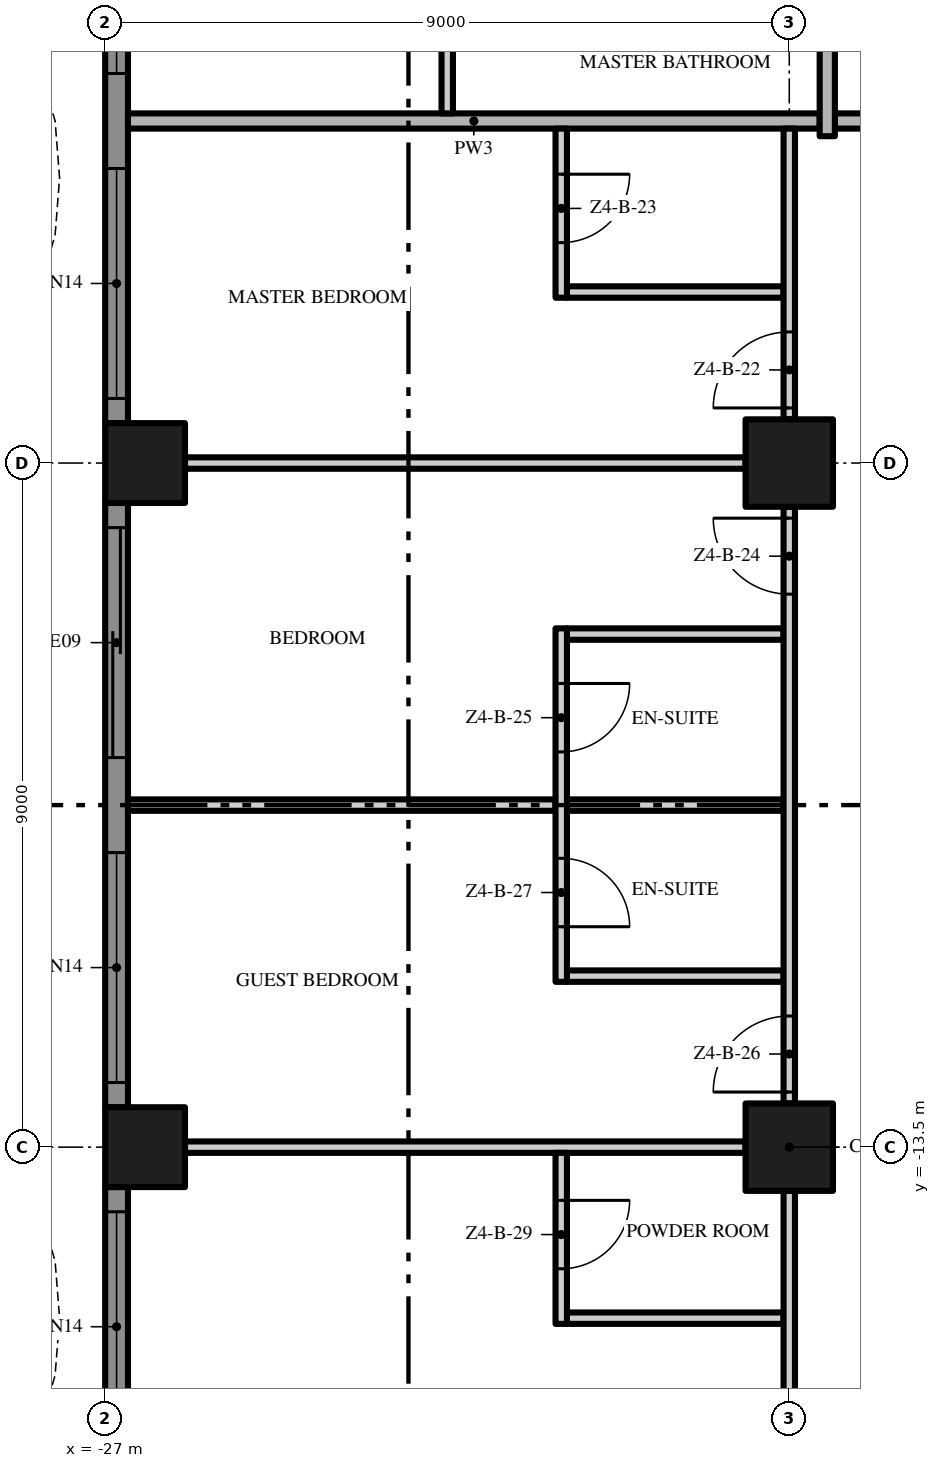
"""IFC4 building model, lengths in metres.
Left out: names, types, materials, properties, quantities, classifications, styles, units other than length and angle.
Written with IfcOpenShell. Run it as: python <this file> out.ifc"""

import sys

from ifc_helpers import new_model, si_unit, direction, frame, frame_2d, origin, origin_2d, place, context, subcontext, project, spatial, polyline, rectangle, outline, extrude, element, fill, save


model = new_model("IFC4")
c1 = context("Model", 3, precision=1e-05, world=origin(), true_north=direction((0.0, 1.0)))
c2 = subcontext(c1, "Body", "Model", "MODEL_VIEW")
j1 = project(units=[si_unit("LENGTHUNIT", "METRE"), si_unit("PLANEANGLEUNIT", "RADIAN")], contexts=[c1])
p1 = place(None, origin())
s1 = spatial("IfcSite", under=j1, at=p1, CompositionType="ELEMENT")
p2 = place(p1, origin())
s2 = spatial("IfcBuilding", under=s1, at=p2, CompositionType="ELEMENT")
p3 = place(p2, frame((0.0, 0.0, 195.8)))
s3 = spatial("IfcBuildingStorey", under=s2, at=p3, CompositionType="ELEMENT", Elevation=195.8)
for number, where, z_axis, x_axis in (
    (1, (-18.0, -13.5, 0.0), (0.0, 0.0, 1.0), (1.0, 0.0, 0.0)),
    (2, (-18.0, -4.5, 0.0), (0.0, 0.0, 1.0), (1.0, 0.0, 0.0)),
):
    element("IfcColumn", number, at=place(p3, frame(where, z_axis=z_axis, x_axis=x_axis)), inside=s3, PredefinedType="COLUMN", context=c2, shape_type="SweptSolid", body=[
        extrude(rectangle(XDim=1.15, YDim=1.15, at=origin_2d()), origin(), (0.0, 0.0, 1.0), 3.5),
    ])
for number, where, z_axis, x_axis in (
    (3, (-26.475, -13.5, 0.0), (0.0, 0.0, 1.0), (1.0, 0.0, 0.0)),
    (4, (-26.475, -4.5, 0.0), (0.0, 0.0, 1.0), (1.0, 0.0, 0.0)),
):
    element("IfcColumn", number, at=place(p3, frame(where, z_axis=z_axis, x_axis=x_axis)), inside=s3, PredefinedType="COLUMN", context=c2, shape_type="SweptSolid", body=[
        extrude(rectangle(XDim=1.05, YDim=1.05, at=origin_2d()), origin(), (0.0, 0.0, 1.0), 3.5),
    ])
p4 = place(p3, frame((-26.85, -3.975, 0.0), z_axis=(0.0, 0.0, 1.0), x_axis=(0.0, 1.0, 0.0)))
e5 = element("IfcWall", 5, at=p4, inside=s3, PredefinedType="SOLIDWALL", context=c2, shape_type="SweptSolid", body=[
    extrude(rectangle(XDim=7.95, YDim=0.3, at=frame_2d((3.975, 0.0))), origin(), (0.0, 0.0, 1.0), 3.5),
])
p5 = place(p4, frame((4.6, 0.0, 0.45)))
e6 = element("IfcOpeningElement", 6, at=p5, cuts=e5, PredefinedType="OPENING", context=c2, shape_type="SweptSolid", body=[
    extrude(rectangle(XDim=3.025, YDim=2.65, at=frame_2d((1.512, 1.325))), frame((0.0, 0.16, 0.0), z_axis=(0.0, -1.0, 0.0), x_axis=(1.0, 0.0, 0.0)), (0.0, 0.0, 1.0), 0.32),
])
p6 = place(p4, frame((0.325, 0.0, 0.45)))
e7 = element("IfcOpeningElement", 7, at=p6, cuts=e5, PredefinedType="OPENING", context=c2, shape_type="SweptSolid", body=[
    extrude(rectangle(XDim=3.025, YDim=2.65, at=frame_2d((1.512, 1.325))), frame((0.0, 0.16, 0.0), z_axis=(0.0, -1.0, 0.0), x_axis=(1.0, 0.0, 0.0)), (0.0, 0.0, 1.0), 0.32),
])
p7 = place(p3, frame((-26.85, -12.975, 0.0), z_axis=(0.0, 0.0, 1.0), x_axis=(0.0, 1.0, 0.0)))
e8 = element("IfcWall", 8, at=p7, inside=s3, PredefinedType="SOLIDWALL", context=c2, shape_type="SweptSolid", body=[
    extrude(rectangle(XDim=7.95, YDim=0.3, at=frame_2d((3.975, 0.0))), origin(), (0.0, 0.0, 1.0), 3.5),
])
p8 = place(p7, frame((4.6, 0.0, 0.0)))
e9 = element("IfcOpeningElement", 9, at=p8, cuts=e8, PredefinedType="OPENING", context=c2, shape_type="SweptSolid", body=[
    extrude(rectangle(XDim=3.025, YDim=2.4, at=frame_2d((1.512, 1.2))), frame((0.0, 0.16, 0.0), z_axis=(0.0, -1.0, 0.0), x_axis=(1.0, 0.0, 0.0)), (0.0, 0.0, 1.0), 0.32),
])
p9 = place(p7, frame((0.325, 0.0, 0.45)))
e10 = element("IfcOpeningElement", 10, at=p9, cuts=e8, PredefinedType="OPENING", context=c2, shape_type="SweptSolid", body=[
    extrude(rectangle(XDim=3.025, YDim=2.65, at=frame_2d((1.512, 1.325))), frame((0.0, 0.16, 0.0), z_axis=(0.0, -1.0, 0.0), x_axis=(1.0, 0.0, 0.0)), (0.0, 0.0, 1.0), 0.32),
])
p10 = place(p3, frame((-26.85, -18.0, 0.0), z_axis=(0.0, 0.0, 1.0), x_axis=(0.0, 1.0, 0.0)))
e11 = element("IfcWall", 11, at=p10, inside=s3, PredefinedType="SOLIDWALL", context=c2, shape_type="SweptSolid", body=[
    extrude(rectangle(XDim=3.975, YDim=0.3, at=frame_2d((1.988, 0.0))), origin(), (0.0, 0.0, 1.0), 3.5),
])
p11 = place(p10, frame((0.625, 0.0, 0.45)))
e12 = element("IfcOpeningElement", 12, at=p11, cuts=e11, PredefinedType="OPENING", context=c2, shape_type="SweptSolid", body=[
    extrude(rectangle(XDim=3.025, YDim=2.65, at=frame_2d((1.512, 1.325))), frame((0.0, 0.16, 0.0), z_axis=(0.0, -1.0, 0.0), x_axis=(1.0, 0.0, 0.0)), (0.0, 0.0, 1.0), 0.32),
])
p12 = place(p3, origin())
e13 = element("IfcWall", 13, at=p12, inside=s3, PredefinedType="USERDEFINED", context=c2, shape_type="SweptSolid", body=[
    extrude(outline(polyline([(-28.8, 18.0), (-28.095, 16.5), (-27.659, 15.0), (-27.6, 14.25), (-27.659, 13.5), (-28.095, 12.0), (-28.8, 10.5), (-29.505, 9.0), (-29.941, 7.5), (-30.0, 6.75), (-29.941, 6.0), (-29.505, 4.5), (-28.8, 3.0), (-28.095, 1.5), (-27.659, 0.0), (-27.6, -0.75), (-27.659, -1.5), (-28.095, -3.0), (-28.8, -4.5), (-29.505, -6.0), (-29.941, -7.5), (-30.0, -8.25), (-29.941, -9.0), (-29.505, -10.5), (-28.8, -12.0), (-28.095, -13.5), (-27.659, -15.0), (-27.6, -15.75), (-27.659, -16.5), (-28.095, -18.0), (-27.855, -18.07), (-27.411, -16.545), (-27.349, -15.75), (-27.411, -14.955), (-27.86, -13.411), (-28.574, -11.894), (-29.271, -10.411), (-29.694, -8.955), (-29.749, -8.25), (-29.694, -7.545), (-29.271, -6.089), (-28.574, -4.606), (-27.86, -3.089), (-27.411, -1.545), (-27.349, -0.75), (-27.411, 0.045), (-27.86, 1.589), (-28.574, 3.106), (-29.271, 4.589), (-29.694, 6.045), (-29.749, 6.75), (-29.694, 7.455), (-29.271, 8.911), (-28.574, 10.394), (-27.86, 11.911), (-27.411, 13.455), (-27.349, 14.25), (-27.411, 15.045), (-27.86, 16.589), (-28.574, 18.106), (-28.8, 18.0)])), origin(), (0.0, 0.0, 1.0), 0.9),
])
p13 = place(p3, frame((-20.925, -15.75, 0.0), z_axis=(0.0, 0.0, 1.0), x_axis=(1.0, 0.0, 0.0)))
e14 = element("IfcWall", 14, at=p13, inside=s3, PredefinedType="PARTITIONING", context=c2, shape_type="SweptSolid", body=[
    extrude(rectangle(XDim=2.85, YDim=0.15, at=frame_2d((1.425, 0.0))), origin(), (0.0, 0.0, 1.0), 3.5),
])
p14 = place(p3, frame((-25.95, -13.5, 0.0), z_axis=(0.0, 0.0, 1.0), x_axis=(1.0, 0.0, 0.0)))
e15 = element("IfcWall", 15, at=p14, inside=s3, PredefinedType="PARTITIONING", context=c2, shape_type="SweptSolid", body=[
    extrude(rectangle(XDim=7.375, YDim=0.15, at=frame_2d((3.688, 0.0))), origin(), (0.0, 0.0, 1.0), 3.5),
])
p15 = place(p3, frame((-20.925, -11.25, 0.0), z_axis=(0.0, 0.0, 1.0), x_axis=(1.0, 0.0, 0.0)))
e16 = element("IfcWall", 16, at=p15, inside=s3, PredefinedType="PARTITIONING", context=c2, shape_type="SweptSolid", body=[
    extrude(rectangle(XDim=2.85, YDim=0.15, at=frame_2d((1.425, 0.0))), origin(), (0.0, 0.0, 1.0), 3.5),
])
p16 = place(p3, frame((-26.7, -9.0, 0.0), z_axis=(0.0, 0.0, 1.0), x_axis=(1.0, 0.0, 0.0)))
e17 = element("IfcWall", 17, at=p16, inside=s3, PredefinedType="PARTITIONING", context=c2, shape_type="SweptSolid", body=[
    extrude(rectangle(XDim=5.625, YDim=0.15, at=frame_2d((2.812, 0.0))), origin(), (0.0, 0.0, 1.0), 3.5),
])
for number, where, z_axis, x_axis in (
    (18, (-20.925, -9.0, 0.0), (0.0, 0.0, 1.0), (1.0, 0.0, 0.0)),
    (19, (-20.925, -6.75, 0.0), (0.0, 0.0, 1.0), (1.0, 0.0, 0.0)),
):
    element("IfcWall", number, at=place(p3, frame(where, z_axis=z_axis, x_axis=x_axis)), inside=s3, PredefinedType="PARTITIONING", context=c2, shape_type="SweptSolid", body=[
        extrude(rectangle(XDim=2.85, YDim=0.15, at=frame_2d((1.425, 0.0))), origin(), (0.0, 0.0, 1.0), 3.5),
    ])
p17 = place(p3, frame((-25.95, -4.5, 0.0), z_axis=(0.0, 0.0, 1.0), x_axis=(1.0, 0.0, 0.0)))
e20 = element("IfcWall", 20, at=p17, inside=s3, PredefinedType="PARTITIONING", context=c2, shape_type="SweptSolid", body=[
    extrude(rectangle(XDim=7.375, YDim=0.15, at=frame_2d((3.688, 0.0))), origin(), (0.0, 0.0, 1.0), 3.5),
])
p18 = place(p3, frame((-20.925, -2.25, 0.0), z_axis=(0.0, 0.0, 1.0), x_axis=(1.0, 0.0, 0.0)))
e21 = element("IfcWall", 21, at=p18, inside=s3, PredefinedType="PARTITIONING", context=c2, shape_type="SweptSolid", body=[
    extrude(rectangle(XDim=2.85, YDim=0.15, at=frame_2d((1.425, 0.0))), origin(), (0.0, 0.0, 1.0), 3.5),
])
p19 = place(p3, frame((-17.4, 0.0, 0.0), z_axis=(0.0, 0.0, 1.0), x_axis=(1.0, 0.0, 0.0)))
e22 = element("IfcWall", 22, at=p19, inside=s3, PredefinedType="PARTITIONING", context=c2, shape_type="SweptSolid", body=[
    extrude(rectangle(XDim=12.8, YDim=0.2, at=frame_2d((6.4, 0.0))), origin(), (0.0, 0.0, 1.0), 3.5),
])
p20 = place(p3, frame((-26.7, 0.0, 0.0), z_axis=(0.0, 0.0, 1.0), x_axis=(1.0, 0.0, 0.0)))
e23 = element("IfcWall", 23, at=p20, inside=s3, PredefinedType="PARTITIONING", context=c2, shape_type="SweptSolid", body=[
    extrude(rectangle(XDim=9.1, YDim=0.2, at=frame_2d((4.55, 0.0))), origin(), (0.0, 0.0, 1.0), 3.5),
])
p21 = place(p3, frame((-22.5, 0.1, 0.0), z_axis=(0.0, 0.0, 1.0), x_axis=(0.0, 1.0, 0.0)))
e24 = element("IfcWall", 24, at=p21, inside=s3, PredefinedType="PARTITIONING", context=c2, shape_type="SweptSolid", body=[
    extrude(rectangle(XDim=17.375, YDim=0.15, at=frame_2d((8.688, 0.0))), origin(), (0.0, 0.0, 1.0), 3.5),
])
p22 = place(p21, frame((1.65, 0.0, 0.0)))
e25 = element("IfcOpeningElement", 25, at=p22, cuts=e24, PredefinedType="OPENING", context=c2, shape_type="SweptSolid", body=[
    extrude(rectangle(XDim=1.0, YDim=2.4, at=frame_2d((0.5, 1.2))), frame((0.0, 0.085, 0.0), z_axis=(0.0, -1.0, 0.0), x_axis=(1.0, 0.0, 0.0)), (0.0, 0.0, 1.0), 0.17),
])
p23 = place(p21, frame((8.0, 0.0, 0.0)))
e26 = element("IfcOpeningElement", 26, at=p23, cuts=e24, PredefinedType="OPENING", context=c2, shape_type="SweptSolid", body=[
    extrude(rectangle(XDim=1.8, YDim=2.4, at=frame_2d((0.9, 1.2))), frame((0.0, 0.085, 0.0), z_axis=(0.0, -1.0, 0.0), x_axis=(1.0, 0.0, 0.0)), (0.0, 0.0, 1.0), 0.17),
])
p24 = place(p3, frame((-21.0, -13.575, 0.0), z_axis=(0.0, 0.0, 1.0), x_axis=(0.0, -1.0, 0.0)))
e27 = element("IfcWall", 27, at=p24, inside=s3, PredefinedType="PARTITIONING", context=c2, shape_type="SweptSolid", body=[
    extrude(rectangle(XDim=2.25, YDim=0.15, at=frame_2d((1.125, 0.0))), origin(), (0.0, 0.0, 1.0), 3.5),
])
p25 = place(p24, frame((0.625, 0.0, 0.0)))
e28 = element("IfcOpeningElement", 28, at=p25, cuts=e27, PredefinedType="OPENING", context=c2, shape_type="SweptSolid", body=[
    extrude(rectangle(XDim=0.9, YDim=2.1, at=frame_2d((0.45, 1.05))), frame((0.0, 0.085, 0.0), z_axis=(0.0, -1.0, 0.0), x_axis=(1.0, 0.0, 0.0)), (0.0, 0.0, 1.0), 0.17),
])
p26 = place(p3, frame((-21.0, -6.675, 0.0), z_axis=(0.0, 0.0, 1.0), x_axis=(0.0, -1.0, 0.0)))
e29 = element("IfcWall", 29, at=p26, inside=s3, PredefinedType="PARTITIONING", context=c2, shape_type="SweptSolid", body=[
    extrude(rectangle(XDim=4.65, YDim=0.15, at=frame_2d((2.325, 0.0))), origin(), (0.0, 0.0, 1.0), 3.5),
])
p27 = place(p26, frame((0.725, 0.0, 0.0)))
e30 = element("IfcOpeningElement", 30, at=p27, cuts=e29, PredefinedType="OPENING", context=c2, shape_type="SweptSolid", body=[
    extrude(rectangle(XDim=0.9, YDim=2.1, at=frame_2d((0.45, 1.05))), frame((0.0, 0.085, 0.0), z_axis=(0.0, -1.0, 0.0), x_axis=(1.0, 0.0, 0.0)), (0.0, 0.0, 1.0), 0.17),
])
p28 = place(p26, frame((3.025, 0.0, 0.0)))
e31 = element("IfcOpeningElement", 31, at=p28, cuts=e29, PredefinedType="OPENING", context=c2, shape_type="SweptSolid", body=[
    extrude(rectangle(XDim=0.9, YDim=2.1, at=frame_2d((0.45, 1.05))), frame((0.0, 0.085, 0.0), z_axis=(0.0, -1.0, 0.0), x_axis=(1.0, 0.0, 0.0)), (0.0, 0.0, 1.0), 0.17),
])
p29 = place(p3, frame((-21.0, -0.1, 0.0), z_axis=(0.0, 0.0, 1.0), x_axis=(0.0, -1.0, 0.0)))
e32 = element("IfcWall", 32, at=p29, inside=s3, PredefinedType="PARTITIONING", context=c2, shape_type="SweptSolid", body=[
    extrude(rectangle(XDim=2.225, YDim=0.15, at=frame_2d((1.113, 0.0))), origin(), (0.0, 0.0, 1.0), 3.5),
])
p30 = place(p29, frame((0.6, 0.0, 0.0)))
e33 = element("IfcOpeningElement", 33, at=p30, cuts=e32, PredefinedType="OPENING", context=c2, shape_type="SweptSolid", body=[
    extrude(rectangle(XDim=0.9, YDim=2.1, at=frame_2d((0.45, 1.05))), frame((0.0, 0.085, 0.0), z_axis=(0.0, -1.0, 0.0), x_axis=(1.0, 0.0, 0.0)), (0.0, 0.0, 1.0), 0.17),
])
p31 = place(p3, frame((-18.0, -21.45, 0.0), z_axis=(0.0, 0.0, 1.0), x_axis=(0.0, 1.0, 0.0)))
e34 = element("IfcWall", 34, at=p31, inside=s3, PredefinedType="PARTITIONING", context=c2, shape_type="SweptSolid", body=[
    extrude(rectangle(XDim=7.375, YDim=0.15, at=frame_2d((3.688, 0.0))), origin(), (0.0, 0.0, 1.0), 3.5),
])
p32 = place(p31, frame((1.45, 0.0, 0.0)))
e35 = element("IfcOpeningElement", 35, at=p32, cuts=e34, PredefinedType="OPENING", context=c2, shape_type="SweptSolid", body=[
    extrude(rectangle(XDim=1.8, YDim=2.4, at=frame_2d((0.9, 1.2))), frame((0.0, 0.085, 0.0), z_axis=(0.0, -1.0, 0.0), x_axis=(1.0, 0.0, 0.0)), (0.0, 0.0, 1.0), 0.17),
])
p33 = place(p3, frame((-18.0, -12.925, 0.0), z_axis=(0.0, 0.0, 1.0), x_axis=(0.0, 1.0, 0.0)))
e36 = element("IfcWall", 36, at=p33, inside=s3, PredefinedType="PARTITIONING", context=c2, shape_type="SweptSolid", body=[
    extrude(rectangle(XDim=7.85, YDim=0.15, at=frame_2d((3.925, 0.0))), origin(), (0.0, 0.0, 1.0), 3.5),
])
p34 = place(p33, frame((6.7, 0.0, 0.0)))
e37 = element("IfcOpeningElement", 37, at=p34, cuts=e36, PredefinedType="OPENING", context=c2, shape_type="SweptSolid", body=[
    extrude(rectangle(XDim=1.0, YDim=2.4, at=frame_2d((0.5, 1.2))), frame((0.0, 0.085, 0.0), z_axis=(0.0, -1.0, 0.0), x_axis=(1.0, 0.0, 0.0)), (0.0, 0.0, 1.0), 0.17),
])
p35 = place(p33, frame((0.15, 0.0, 0.0)))
e38 = element("IfcOpeningElement", 38, at=p35, cuts=e36, PredefinedType="OPENING", context=c2, shape_type="SweptSolid", body=[
    extrude(rectangle(XDim=1.0, YDim=2.4, at=frame_2d((0.5, 1.2))), frame((0.0, 0.085, 0.0), z_axis=(0.0, -1.0, 0.0), x_axis=(1.0, 0.0, 0.0)), (0.0, 0.0, 1.0), 0.17),
])
p36 = place(p3, frame((-18.0, -3.925, 0.0), z_axis=(0.0, 0.0, 1.0), x_axis=(0.0, 1.0, 0.0)))
e39 = element("IfcWall", 39, at=p36, inside=s3, PredefinedType="PARTITIONING", context=c2, shape_type="SweptSolid", body=[
    extrude(rectangle(XDim=3.825, YDim=0.15, at=frame_2d((1.913, 0.0))), origin(), (0.0, 0.0, 1.0), 3.5),
])
p37 = place(p36, frame((0.15, 0.0, 0.0)))
e40 = element("IfcOpeningElement", 40, at=p37, cuts=e39, PredefinedType="OPENING", context=c2, shape_type="SweptSolid", body=[
    extrude(rectangle(XDim=1.0, YDim=2.4, at=frame_2d((0.5, 1.2))), frame((0.0, 0.085, 0.0), z_axis=(0.0, -1.0, 0.0), x_axis=(1.0, 0.0, 0.0)), (0.0, 0.0, 1.0), 0.17),
])
p38 = place(p3, frame((-17.5, -0.2, 0.0), z_axis=(0.0, 0.0, 1.0), x_axis=(0.0, 1.0, 0.0)))
e41 = element("IfcWall", 41, at=p38, inside=s3, PredefinedType="PARTITIONING", context=c2, shape_type="SweptSolid", body=[
    extrude(rectangle(XDim=4.125, YDim=0.2, at=frame_2d((2.062, 0.0))), origin(), (0.0, 0.0, 1.0), 3.5),
])
p39 = place(p5, origin())
e42 = element("IfcWindow", 42, at=p39, inside=s3, PartitioningType="SINGLE_PANEL", PredefinedType="WINDOW", context=c2, shape_type="SweptSolid", body=[
    extrude(rectangle(XDim=3.025, YDim=2.65, at=frame_2d((1.512, 1.325))), frame((0.0, 0.03, 0.0), z_axis=(0.0, -1.0, 0.0), x_axis=(1.0, 0.0, 0.0)), (0.0, 0.0, 1.0), 0.06),
])
fill(e6, e42)
p40 = place(p6, origin())
e43 = element("IfcWindow", 43, at=p40, inside=s3, PartitioningType="SINGLE_PANEL", PredefinedType="WINDOW", context=c2, shape_type="SweptSolid", body=[
    extrude(rectangle(XDim=3.025, YDim=2.65, at=frame_2d((1.512, 1.325))), frame((0.0, 0.03, 0.0), z_axis=(0.0, -1.0, 0.0), x_axis=(1.0, 0.0, 0.0)), (0.0, 0.0, 1.0), 0.06),
])
fill(e7, e43)
p41 = place(p8, origin())
e44 = element("IfcDoor", 44, at=p41, inside=s3, OperationType="SINGLE_SWING_LEFT", PredefinedType="DOOR", context=c2, shape_type="SweptSolid", body=[
    extrude(rectangle(XDim=3.025, YDim=2.4, at=frame_2d((1.512, 1.2))), frame((0.0, 0.025, 0.0), z_axis=(0.0, -1.0, 0.0), x_axis=(1.0, 0.0, 0.0)), (0.0, 0.0, 1.0), 0.05),
])
fill(e9, e44)
p42 = place(p9, origin())
e45 = element("IfcWindow", 45, at=p42, inside=s3, PartitioningType="SINGLE_PANEL", PredefinedType="WINDOW", context=c2, shape_type="SweptSolid", body=[
    extrude(rectangle(XDim=3.025, YDim=2.65, at=frame_2d((1.512, 1.325))), frame((0.0, 0.03, 0.0), z_axis=(0.0, -1.0, 0.0), x_axis=(1.0, 0.0, 0.0)), (0.0, 0.0, 1.0), 0.06),
])
fill(e10, e45)
p43 = place(p11, origin())
e46 = element("IfcWindow", 46, at=p43, inside=s3, PartitioningType="SINGLE_PANEL", PredefinedType="WINDOW", context=c2, shape_type="SweptSolid", body=[
    extrude(rectangle(XDim=3.025, YDim=2.65, at=frame_2d((1.512, 1.325))), frame((0.0, 0.03, 0.0), z_axis=(0.0, -1.0, 0.0), x_axis=(1.0, 0.0, 0.0)), (0.0, 0.0, 1.0), 0.06),
])
fill(e12, e46)
p44 = place(p37, origin())
e47 = element("IfcDoor", 47, at=p44, inside=s3, OperationType="SINGLE_SWING_LEFT", PredefinedType="DOOR", context=c2, shape_type="SweptSolid", body=[
    extrude(rectangle(XDim=1.0, YDim=2.4, at=frame_2d((0.5, 1.2))), frame((0.0, 0.025, 0.0), z_axis=(0.0, -1.0, 0.0), x_axis=(1.0, 0.0, 0.0)), (0.0, 0.0, 1.0), 0.05),
])
fill(e40, e47)
p45 = place(p30, origin())
e48 = element("IfcDoor", 48, at=p45, inside=s3, OperationType="SINGLE_SWING_LEFT", PredefinedType="DOOR", context=c2, shape_type="SweptSolid", body=[
    extrude(rectangle(XDim=0.9, YDim=2.1, at=frame_2d((0.45, 1.05))), frame((0.0, 0.025, 0.0), z_axis=(0.0, -1.0, 0.0), x_axis=(1.0, 0.0, 0.0)), (0.0, 0.0, 1.0), 0.05),
])
fill(e33, e48)
p46 = place(p34, origin())
e49 = element("IfcDoor", 49, at=p46, inside=s3, OperationType="SINGLE_SWING_RIGHT", PredefinedType="DOOR", context=c2, shape_type="SweptSolid", body=[
    extrude(rectangle(XDim=1.0, YDim=2.4, at=frame_2d((0.5, 1.2))), frame((0.0, 0.025, 0.0), z_axis=(0.0, -1.0, 0.0), x_axis=(1.0, 0.0, 0.0)), (0.0, 0.0, 1.0), 0.05),
])
fill(e37, e49)
p47 = place(p27, origin())
e50 = element("IfcDoor", 50, at=p47, inside=s3, OperationType="SINGLE_SWING_LEFT", PredefinedType="DOOR", context=c2, shape_type="SweptSolid", body=[
    extrude(rectangle(XDim=0.9, YDim=2.1, at=frame_2d((0.45, 1.05))), frame((0.0, 0.025, 0.0), z_axis=(0.0, -1.0, 0.0), x_axis=(1.0, 0.0, 0.0)), (0.0, 0.0, 1.0), 0.05),
])
fill(e30, e50)
p48 = place(p35, origin())
e51 = element("IfcDoor", 51, at=p48, inside=s3, OperationType="SINGLE_SWING_LEFT", PredefinedType="DOOR", context=c2, shape_type="SweptSolid", body=[
    extrude(rectangle(XDim=1.0, YDim=2.4, at=frame_2d((0.5, 1.2))), frame((0.0, 0.025, 0.0), z_axis=(0.0, -1.0, 0.0), x_axis=(1.0, 0.0, 0.0)), (0.0, 0.0, 1.0), 0.05),
])
fill(e38, e51)
p49 = place(p28, origin())
e52 = element("IfcDoor", 52, at=p49, inside=s3, OperationType="SINGLE_SWING_RIGHT", PredefinedType="DOOR", context=c2, shape_type="SweptSolid", body=[
    extrude(rectangle(XDim=0.9, YDim=2.1, at=frame_2d((0.45, 1.05))), frame((0.0, 0.025, 0.0), z_axis=(0.0, -1.0, 0.0), x_axis=(1.0, 0.0, 0.0)), (0.0, 0.0, 1.0), 0.05),
])
fill(e31, e52)
p50 = place(p25, origin())
e53 = element("IfcDoor", 53, at=p50, inside=s3, OperationType="SINGLE_SWING_LEFT", PredefinedType="DOOR", context=c2, shape_type="SweptSolid", body=[
    extrude(rectangle(XDim=0.9, YDim=2.1, at=frame_2d((0.45, 1.05))), frame((0.0, 0.025, 0.0), z_axis=(0.0, -1.0, 0.0), x_axis=(1.0, 0.0, 0.0)), (0.0, 0.0, 1.0), 0.05),
])
fill(e28, e53)
save(model, sys.argv[1])
